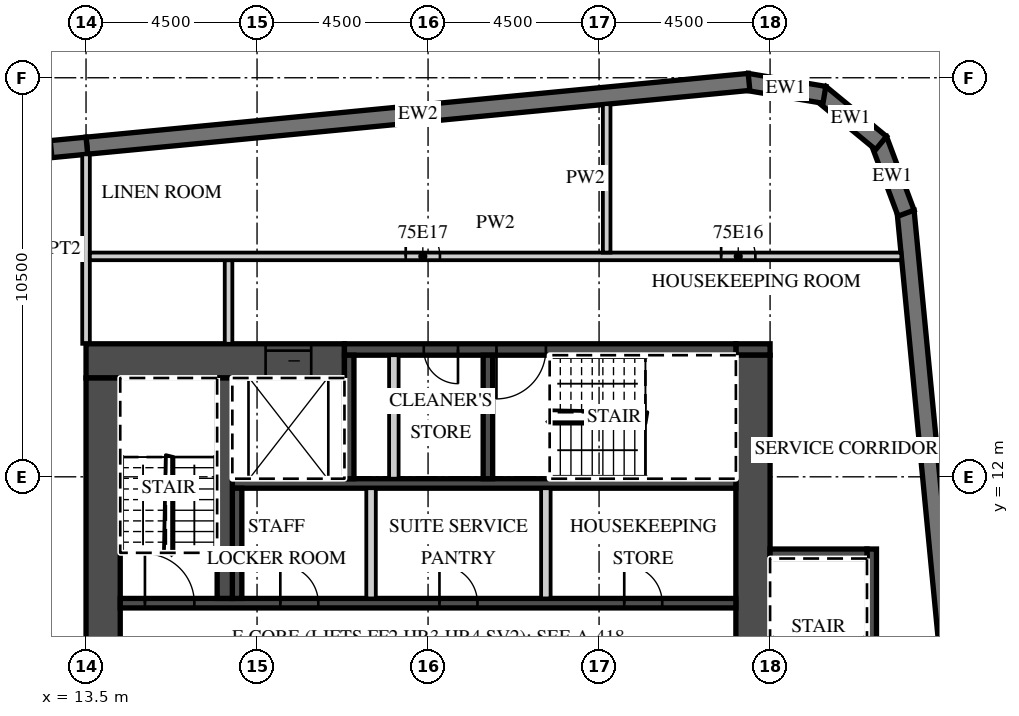
"""IFC4 building model, lengths in metres.
Left out: names, types, materials, properties, quantities, classifications, styles, units other than length and angle.
Written with IfcOpenShell. Run it as: python <this file> out.ifc"""

import sys

from ifc_helpers import new_model, si_unit, direction, frame, frame_2d, origin, place, context, subcontext, project, spatial, polyline, rectangle, outline, extrude, element, fill, save


model = new_model("IFC4")
c1 = context("Model", 3, precision=1e-05, world=origin(), true_north=direction((0.0, 1.0)))
c2 = subcontext(c1, "Body", "Model", "MODEL_VIEW")
j1 = project(units=[si_unit("LENGTHUNIT", "METRE"), si_unit("PLANEANGLEUNIT", "RADIAN")], contexts=[c1])
p1 = place(None, origin())
s1 = spatial("IfcSite", under=j1, at=p1, CompositionType="ELEMENT")
p2 = place(p1, origin())
s2 = spatial("IfcBuilding", under=s1, at=p2, CompositionType="ELEMENT")
p3 = place(p2, frame((0.0, 0.0, 298.2)))
s3 = spatial("IfcBuildingStorey", under=s2, at=p3, CompositionType="ELEMENT", Elevation=298.2)
p4 = place(p3, frame((38.132, -12.858, 0.0), z_axis=(0.0, 0.0, 1.0), x_axis=(-0.095847749461, 0.995396006082, 0.0)))
e1 = element("IfcWall", 1, at=p4, inside=s3, PredefinedType="SOLIDWALL", context=c2, shape_type="SweptSolid", body=[
    extrude(rectangle(XDim=32.0, YDim=0.45, at=frame_2d((16.0, 0.0))), origin(), (0.0, 0.0, 1.0), 3.02),
])
p5 = place(p3, frame((35.078, 18.938, 0.0), z_axis=(0.0, 0.0, 1.0), x_axis=(-0.350192909346, 0.936677599948, 0.0)))
e2 = element("IfcWall", 2, at=p5, inside=s3, PredefinedType="SOLIDWALL", context=c2, shape_type="SweptSolid", body=[
    extrude(outline(polyline([(0.0, -0.225), (2.071, -0.225), (1.95, 0.225), (0.121, 0.225), (0.0, -0.225)])), origin(), (0.0, 0.0, 1.0), 3.02),
])
p6 = place(p3, frame((34.421, 20.782, 0.0), z_axis=(0.0, 0.0, 1.0), x_axis=(-0.771593176315, 0.636116318187, 0.0)))
e3 = element("IfcWall", 3, at=p6, inside=s3, PredefinedType="SOLIDWALL", context=c2, shape_type="SweptSolid", body=[
    extrude(outline(polyline([(0.0, -0.225), (2.071, -0.225), (1.95, 0.225), (0.12, 0.225), (0.0, -0.225)])), origin(), (0.0, 0.0, 1.0), 3.02),
])
p7 = place(p3, frame((32.929, 22.051, 0.0), z_axis=(0.0, 0.0, 1.0), x_axis=(-0.986298144721, 0.164972633245, 0.0)))
e4 = element("IfcWall", 4, at=p7, inside=s3, PredefinedType="SOLIDWALL", context=c2, shape_type="SweptSolid", body=[
    extrude(outline(polyline([(0.0, -0.225), (2.07, -0.225), (1.95, 0.225), (0.121, 0.225), (0.0, -0.225)])), origin(), (0.0, 0.0, 1.0), 3.02),
])
p8 = place(p3, frame((30.946, 22.391, 0.0), z_axis=(0.0, 0.0, 1.0), x_axis=(-0.995396397117, -0.095843688398, 0.0)))
e5 = element("IfcWall", 5, at=p8, inside=s3, PredefinedType="SOLIDWALL", context=c2, shape_type="SweptSolid", body=[
    extrude(rectangle(XDim=17.505, YDim=0.45, at=frame_2d((8.752, 0.0))), origin(), (0.0, 0.0, 1.0), 3.02),
])
p9 = place(p3, frame((13.521, 20.713, 0.0), z_axis=(0.0, 0.0, 1.0), x_axis=(-0.995396277313, -0.095844932638, 0.0)))
e6 = element("IfcWall", 6, at=p9, inside=s3, PredefinedType="SOLIDWALL", context=c2, shape_type="SweptSolid", body=[
    extrude(rectangle(XDim=51.495, YDim=0.45, at=frame_2d((25.748, 0.0))), origin(), (0.0, 0.0, 1.0), 3.02),
])
p10 = place(p9, frame((0.91, 0.0, 0.45)))
e7 = element("IfcOpeningElement", 7, at=p10, cuts=e6, PredefinedType="OPENING", context=c2, shape_type="SweptSolid", body=[
    extrude(rectangle(XDim=2.7, YDim=2.25, at=frame_2d((1.35, 1.125))), frame((0.0, 0.235, 0.0), z_axis=(0.0, -1.0, 0.0), x_axis=(1.0, 0.0, 0.0)), (0.0, 0.0, 1.0), 0.47),
])
p11 = place(p9, frame((5.431, 0.0, 0.45)))
e8 = element("IfcOpeningElement", 8, at=p11, cuts=e6, PredefinedType="OPENING", context=c2, shape_type="SweptSolid", body=[
    extrude(rectangle(XDim=2.7, YDim=2.25, at=frame_2d((1.35, 1.125))), frame((0.0, 0.235, 0.0), z_axis=(0.0, -1.0, 0.0), x_axis=(1.0, 0.0, 0.0)), (0.0, 0.0, 1.0), 0.47),
])
p12 = place(p9, frame((9.952, 0.0, 0.45)))
e9 = element("IfcOpeningElement", 9, at=p12, cuts=e6, PredefinedType="OPENING", context=c2, shape_type="SweptSolid", body=[
    extrude(rectangle(XDim=2.7, YDim=2.25, at=frame_2d((1.35, 1.125))), frame((0.0, 0.235, 0.0), z_axis=(0.0, -1.0, 0.0), x_axis=(1.0, 0.0, 0.0)), (0.0, 0.0, 1.0), 0.47),
])
p13 = place(p9, frame((14.473, 0.0, 0.45)))
e10 = element("IfcOpeningElement", 10, at=p13, cuts=e6, PredefinedType="OPENING", context=c2, shape_type="SweptSolid", body=[
    extrude(rectangle(XDim=2.7, YDim=2.25, at=frame_2d((1.35, 1.125))), frame((0.0, 0.235, 0.0), z_axis=(0.0, -1.0, 0.0), x_axis=(1.0, 0.0, 0.0)), (0.0, 0.0, 1.0), 0.47),
])
p14 = place(p9, frame((18.994, 0.0, 0.45)))
e11 = element("IfcOpeningElement", 11, at=p14, cuts=e6, PredefinedType="OPENING", context=c2, shape_type="SweptSolid", body=[
    extrude(rectangle(XDim=2.7, YDim=2.25, at=frame_2d((1.35, 1.125))), frame((0.0, 0.235, 0.0), z_axis=(0.0, -1.0, 0.0), x_axis=(1.0, 0.0, 0.0)), (0.0, 0.0, 1.0), 0.47),
])
p15 = place(p9, frame((23.514, 0.0, 0.45)))
e12 = element("IfcOpeningElement", 12, at=p15, cuts=e6, PredefinedType="OPENING", context=c2, shape_type="SweptSolid", body=[
    extrude(rectangle(XDim=2.7, YDim=2.25, at=frame_2d((1.35, 1.125))), frame((0.0, 0.235, 0.0), z_axis=(0.0, -1.0, 0.0), x_axis=(1.0, 0.0, 0.0)), (0.0, 0.0, 1.0), 0.47),
])
p16 = place(p9, frame((28.035, 0.0, 0.45)))
e13 = element("IfcOpeningElement", 13, at=p16, cuts=e6, PredefinedType="OPENING", context=c2, shape_type="SweptSolid", body=[
    extrude(rectangle(XDim=2.7, YDim=2.25, at=frame_2d((1.35, 1.125))), frame((0.0, 0.235, 0.0), z_axis=(0.0, -1.0, 0.0), x_axis=(1.0, 0.0, 0.0)), (0.0, 0.0, 1.0), 0.47),
])
p17 = place(p9, frame((32.556, 0.0, 0.45)))
e14 = element("IfcOpeningElement", 14, at=p17, cuts=e6, PredefinedType="OPENING", context=c2, shape_type="SweptSolid", body=[
    extrude(rectangle(XDim=2.7, YDim=2.25, at=frame_2d((1.35, 1.125))), frame((0.0, 0.235, 0.0), z_axis=(0.0, -1.0, 0.0), x_axis=(1.0, 0.0, 0.0)), (0.0, 0.0, 1.0), 0.47),
])
p18 = place(p9, frame((37.077, 0.0, 0.45)))
e15 = element("IfcOpeningElement", 15, at=p18, cuts=e6, PredefinedType="OPENING", context=c2, shape_type="SweptSolid", body=[
    extrude(rectangle(XDim=2.7, YDim=2.25, at=frame_2d((1.35, 1.125))), frame((0.0, 0.235, 0.0), z_axis=(0.0, -1.0, 0.0), x_axis=(1.0, 0.0, 0.0)), (0.0, 0.0, 1.0), 0.47),
])
p19 = place(p9, frame((41.598, 0.0, 0.45)))
e16 = element("IfcOpeningElement", 16, at=p19, cuts=e6, PredefinedType="OPENING", context=c2, shape_type="SweptSolid", body=[
    extrude(rectangle(XDim=2.7, YDim=2.25, at=frame_2d((1.35, 1.125))), frame((0.0, 0.235, 0.0), z_axis=(0.0, -1.0, 0.0), x_axis=(1.0, 0.0, 0.0)), (0.0, 0.0, 1.0), 0.47),
])
p20 = place(p9, frame((46.118, 0.0, 0.45)))
e17 = element("IfcOpeningElement", 17, at=p20, cuts=e6, PredefinedType="OPENING", context=c2, shape_type="SweptSolid", body=[
    extrude(rectangle(XDim=2.7, YDim=2.25, at=frame_2d((1.35, 1.125))), frame((0.0, 0.235, 0.0), z_axis=(0.0, -1.0, 0.0), x_axis=(1.0, 0.0, 0.0)), (0.0, 0.0, 1.0), 0.47),
])
p21 = place(p3, frame((13.5, 15.5, 0.0), z_axis=(0.0, 0.0, 1.0), x_axis=(0.0, 1.0, 0.0)))
e18 = element("IfcWall", 18, at=p21, inside=s3, PredefinedType="PARTITIONING", context=c2, shape_type="SweptSolid", body=[
    extrude(rectangle(XDim=4.985, YDim=0.2, at=frame_2d((2.493, 0.0))), origin(), (0.0, 0.0, 1.0), 3.02),
])
p22 = place(p3, frame((13.5, 15.05, 0.0), z_axis=(0.0, 0.0, 1.0), x_axis=(1.0, 0.0, 0.0)))
e19 = element("IfcWall", 19, at=p22, inside=s3, PredefinedType="SHEAR", context=c2, shape_type="SweptSolid", body=[
    extrude(rectangle(XDim=6.8, YDim=0.9, at=frame_2d((3.4, 0.0))), origin(), (0.0, 0.0, 1.0), 3.02),
])
p23 = place(p22, frame((4.725, 0.0, 0.0)))
e20 = element("IfcOpeningElement", 20, at=p23, cuts=e19, PredefinedType="OPENING", context=c2, shape_type="SweptSolid", body=[
    extrude(rectangle(XDim=1.2, YDim=2.1, at=frame_2d((0.6, 1.05))), frame((0.0, 0.46, 0.0), z_axis=(0.0, -1.0, 0.0), x_axis=(1.0, 0.0, 0.0)), (0.0, 0.0, 1.0), 0.92),
])
p24 = place(p3, frame((30.6, 15.35, 0.0), z_axis=(0.0, 0.0, 1.0), x_axis=(1.0, 0.0, 0.0)))
e21 = element("IfcWall", 21, at=p24, inside=s3, PredefinedType="SHEAR", context=c2, shape_type="SweptSolid", body=[
    extrude(rectangle(XDim=0.9, YDim=0.3, at=frame_2d((0.45, 0.0))), origin(), (0.0, 0.0, 1.0), 3.02),
])
p25 = place(p3, frame((20.3, 15.35, 0.0), z_axis=(0.0, 0.0, 1.0), x_axis=(1.0, 0.0, 0.0)))
e22 = element("IfcWall", 22, at=p25, inside=s3, PredefinedType="SHEAR", context=c2, shape_type="SweptSolid", body=[
    extrude(rectangle(XDim=10.3, YDim=0.3, at=frame_2d((5.15, 0.0))), origin(), (0.0, 0.0, 1.0), 3.02),
])
p26 = place(p25, frame((4.0, 0.0, 0.0)))
e23 = element("IfcOpeningElement", 23, at=p26, cuts=e22, PredefinedType="OPENING", context=c2, shape_type="SweptSolid", body=[
    extrude(rectangle(XDim=1.3, YDim=2.1, at=frame_2d((0.65, 1.05))), frame((0.0, 0.16, 0.0), z_axis=(0.0, -1.0, 0.0), x_axis=(1.0, 0.0, 0.0)), (0.0, 0.0, 1.0), 0.32),
])
p27 = place(p25, frame((2.087, 0.0, 0.0)))
e24 = element("IfcOpeningElement", 24, at=p27, cuts=e22, PredefinedType="OPENING", context=c2, shape_type="SweptSolid", body=[
    extrude(rectangle(XDim=0.9, YDim=2.1, at=frame_2d((0.45, 1.05))), frame((0.0, 0.16, 0.0), z_axis=(0.0, -1.0, 0.0), x_axis=(1.0, 0.0, 0.0)), (0.0, 0.0, 1.0), 0.32),
])
p28 = place(p3, frame((31.05, 2.4, 0.0), z_axis=(0.0, 0.0, 1.0), x_axis=(0.0, 1.0, 0.0)))
e25 = element("IfcWall", 25, at=p28, inside=s3, PredefinedType="SHEAR", context=c2, shape_type="SweptSolid", body=[
    extrude(rectangle(XDim=12.8, YDim=0.9, at=frame_2d((6.4, 0.0))), origin(), (0.0, 0.0, 1.0), 3.02),
])
p29 = place(p28, frame((0.2, 0.0, 0.0)))
e26 = element("IfcOpeningElement", 26, at=p29, cuts=e25, PredefinedType="OPENING", context=c2, shape_type="SweptSolid", body=[
    extrude(rectangle(XDim=1.1, YDim=2.1, at=frame_2d((0.55, 1.05))), frame((0.0, 0.46, 0.0), z_axis=(0.0, -1.0, 0.0), x_axis=(1.0, 0.0, 0.0)), (0.0, 0.0, 1.0), 0.92),
])
p30 = place(p3, frame((13.95, 2.4, 0.0), z_axis=(0.0, 0.0, 1.0), x_axis=(0.0, 1.0, 0.0)))
e27 = element("IfcWall", 27, at=p30, inside=s3, PredefinedType="SHEAR", context=c2, shape_type="SweptSolid", body=[
    extrude(rectangle(XDim=12.2, YDim=0.9, at=frame_2d((6.1, 0.0))), origin(), (0.0, 0.0, 1.0), 3.02),
])
p31 = place(p3, frame((14.4, 8.675, 0.0), z_axis=(0.0, 0.0, 1.0), x_axis=(1.0, 0.0, 0.0)))
e28 = element("IfcWall", 28, at=p31, inside=s3, PredefinedType="SHEAR", context=c2, shape_type="SweptSolid", body=[
    extrude(rectangle(XDim=16.2, YDim=0.25, at=frame_2d((8.1, 0.0))), origin(), (0.0, 0.0, 1.0), 3.02),
])
p32 = place(p31, frame((0.65, 0.0, 0.0)))
e29 = element("IfcOpeningElement", 29, at=p32, cuts=e28, PredefinedType="OPENING", context=c2, shape_type="SweptSolid", body=[
    extrude(rectangle(XDim=1.3, YDim=2.1, at=frame_2d((0.65, 1.05))), frame((0.0, 0.135, 0.0), z_axis=(0.0, -1.0, 0.0), x_axis=(1.0, 0.0, 0.0)), (0.0, 0.0, 1.0), 0.27),
])
p33 = place(p31, frame((13.262, 0.0, 0.0)))
e30 = element("IfcOpeningElement", 30, at=p33, cuts=e28, PredefinedType="OPENING", context=c2, shape_type="SweptSolid", body=[
    extrude(rectangle(XDim=1.0, YDim=2.1, at=frame_2d((0.5, 1.05))), frame((0.0, 0.135, 0.0), z_axis=(0.0, -1.0, 0.0), x_axis=(1.0, 0.0, 0.0)), (0.0, 0.0, 1.0), 0.27),
])
p34 = place(p31, frame((8.4, 0.0, 0.0)))
e31 = element("IfcOpeningElement", 31, at=p34, cuts=e28, PredefinedType="OPENING", context=c2, shape_type="SweptSolid", body=[
    extrude(rectangle(XDim=1.0, YDim=2.1, at=frame_2d((0.5, 1.05))), frame((0.0, 0.135, 0.0), z_axis=(0.0, -1.0, 0.0), x_axis=(1.0, 0.0, 0.0)), (0.0, 0.0, 1.0), 0.27),
])
p35 = place(p31, frame((4.212, 0.0, 0.0)))
e32 = element("IfcOpeningElement", 32, at=p35, cuts=e28, PredefinedType="OPENING", context=c2, shape_type="SweptSolid", body=[
    extrude(rectangle(XDim=1.0, YDim=2.1, at=frame_2d((0.5, 1.05))), frame((0.0, 0.135, 0.0), z_axis=(0.0, -1.0, 0.0), x_axis=(1.0, 0.0, 0.0)), (0.0, 0.0, 1.0), 0.27),
])
p36 = place(p3, frame((17.35, 11.825, 0.0), z_axis=(0.0, 0.0, 1.0), x_axis=(1.0, 0.0, 0.0)))
e33 = element("IfcWall", 33, at=p36, inside=s3, PredefinedType="SHEAR", context=c2, shape_type="SweptSolid", body=[
    extrude(rectangle(XDim=13.25, YDim=0.25, at=frame_2d((6.625, 0.0))), origin(), (0.0, 0.0, 1.0), 3.02),
])
p37 = place(p3, frame((17.475, 8.8, 0.0), z_axis=(0.0, 0.0, 1.0), x_axis=(0.0, 1.0, 0.0)))
e34 = element("IfcWall", 34, at=p37, inside=s3, PredefinedType="SHEAR", context=c2, shape_type="SweptSolid", body=[
    extrude(rectangle(XDim=2.9, YDim=0.25, at=frame_2d((1.45, 0.0))), origin(), (0.0, 0.0, 1.0), 3.02),
])
for number, where, z_axis, x_axis in (
    (35, (25.6, 8.8, 0.0), (0.0, 0.0, 1.0), (0.0, 1.0, 0.0)),
    (36, (21.0, 8.8, 0.0), (0.0, 0.0, 1.0), (0.0, 1.0, 0.0)),
):
    element("IfcWall", number, at=place(p3, frame(where, z_axis=z_axis, x_axis=x_axis)), inside=s3, PredefinedType="PARTITIONING", context=c2, shape_type="SweptSolid", body=[
        extrude(rectangle(XDim=2.9, YDim=0.25, at=frame_2d((1.45, 0.0))), origin(), (0.0, 0.0, 1.0), 3.02),
    ])
p38 = place(p3, frame((17.15, 8.8, 0.0), z_axis=(0.0, 0.0, 1.0), x_axis=(0.0, 1.0, 0.0)))
e37 = element("IfcWall", 37, at=p38, inside=s3, PredefinedType="SHEAR", context=c2, shape_type="SweptSolid", body=[
    extrude(rectangle(XDim=5.8, YDim=0.4, at=frame_2d((2.9, 0.0))), origin(), (0.0, 0.0, 1.0), 3.02),
])
for number, where, z_axis, x_axis in (
    (38, (20.425, 11.95, 0.0), (0.0, 0.0, 1.0), (0.0, 1.0, 0.0)),
    (39, (24.075, 11.95, 0.0), (0.0, 0.0, 1.0), (0.0, 1.0, 0.0)),
):
    element("IfcWall", number, at=place(p3, frame(where, z_axis=z_axis, x_axis=x_axis)), inside=s3, PredefinedType="SHEAR", context=c2, shape_type="SweptSolid", body=[
        extrude(rectangle(XDim=3.25, YDim=0.25, at=frame_2d((1.625, 0.0))), origin(), (0.0, 0.0, 1.0), 3.02),
    ])
p39 = place(p3, frame((21.6, 11.95, 0.0), z_axis=(0.0, 0.0, 1.0), x_axis=(0.0, 1.0, 0.0)))
e40 = element("IfcWall", 40, at=p39, inside=s3, PredefinedType="PARTITIONING", context=c2, shape_type="SweptSolid", body=[
    extrude(rectangle(XDim=3.25, YDim=0.25, at=frame_2d((1.625, 0.0))), origin(), (0.0, 0.0, 1.0), 3.02),
])
p40 = place(p3, frame((34.175, 1.75, 0.0), z_axis=(0.0, 0.0, 1.0), x_axis=(0.0, 1.0, 0.0)))
e41 = element("IfcWall", 41, at=p40, inside=s3, PredefinedType="SHEAR", context=c2, shape_type="SweptSolid", body=[
    extrude(rectangle(XDim=8.35, YDim=0.25, at=frame_2d((4.175, 0.0))), origin(), (0.0, 0.0, 1.0), 3.02),
])
p41 = place(p3, frame((31.5, 9.975, 0.0), z_axis=(0.0, 0.0, 1.0), x_axis=(1.0, 0.0, 0.0)))
e42 = element("IfcWall", 42, at=p41, inside=s3, PredefinedType="SHEAR", context=c2, shape_type="SweptSolid", body=[
    extrude(rectangle(XDim=2.55, YDim=0.25, at=frame_2d((1.275, 0.0))), origin(), (0.0, 0.0, 1.0), 3.02),
])
p42 = place(p3, frame((17.25, 15.5, 0.0), z_axis=(0.0, 0.0, 1.0), x_axis=(0.0, 1.0, 0.0)))
e43 = element("IfcWall", 43, at=p42, inside=s3, PredefinedType="PARTITIONING", context=c2, shape_type="SweptSolid", body=[
    extrude(rectangle(XDim=2.2, YDim=0.2, at=frame_2d((1.1, 0.0))), origin(), (0.0, 0.0, 1.0), 3.02),
])
p43 = place(p3, frame((13.6, 17.8, 0.0), z_axis=(0.0, 0.0, 1.0), x_axis=(1.0, 0.0, 0.0)))
e44 = element("IfcWall", 44, at=p43, inside=s3, PredefinedType="PARTITIONING", context=c2, shape_type="SweptSolid", body=[
    extrude(rectangle(XDim=21.354, YDim=0.2, at=frame_2d((10.677, 0.0))), origin(), (0.0, 0.0, 1.0), 3.02),
])
p44 = place(p43, frame((16.613, 0.0, 0.0)))
e45 = element("IfcOpeningElement", 45, at=p44, cuts=e44, PredefinedType="OPENING", context=c2, shape_type="SweptSolid", body=[
    extrude(rectangle(XDim=0.9, YDim=2.1, at=frame_2d((0.45, 1.05))), frame((0.0, 0.11, 0.0), z_axis=(0.0, -1.0, 0.0), x_axis=(1.0, 0.0, 0.0)), (0.0, 0.0, 1.0), 0.22),
])
p45 = place(p43, frame((8.312, 0.0, 0.0)))
e46 = element("IfcOpeningElement", 46, at=p45, cuts=e44, PredefinedType="OPENING", context=c2, shape_type="SweptSolid", body=[
    extrude(rectangle(XDim=0.9, YDim=2.1, at=frame_2d((0.45, 1.05))), frame((0.0, 0.11, 0.0), z_axis=(0.0, -1.0, 0.0), x_axis=(1.0, 0.0, 0.0)), (0.0, 0.0, 1.0), 0.22),
])
p46 = place(p3, frame((27.2, 17.9, 0.0), z_axis=(0.0, 0.0, 1.0), x_axis=(0.0, 1.0, 0.0)))
e47 = element("IfcWall", 47, at=p46, inside=s3, PredefinedType="PARTITIONING", context=c2, shape_type="SweptSolid", body=[
    extrude(rectangle(XDim=3.905, YDim=0.2, at=frame_2d((1.953, 0.0))), origin(), (0.0, 0.0, 1.0), 3.02),
])
p47 = place(p10, origin())
e48 = element("IfcWindow", 48, at=p47, inside=s3, PartitioningType="SINGLE_PANEL", PredefinedType="WINDOW", context=c2, shape_type="SweptSolid", body=[
    extrude(rectangle(XDim=2.7, YDim=2.25, at=frame_2d((1.35, 1.125))), frame((0.0, 0.09, 0.0), z_axis=(0.0, -1.0, 0.0), x_axis=(1.0, 0.0, 0.0)), (0.0, 0.0, 1.0), 0.06),
])
fill(e7, e48)
p48 = place(p23, origin())
e49 = element("IfcDoor", 49, at=p48, inside=s3, OperationType="SLIDING_TO_LEFT", PredefinedType="DOOR", context=c2, shape_type="SweptSolid", body=[
    extrude(rectangle(XDim=1.2, YDim=2.1, at=frame_2d((0.6, 1.05))), frame((0.0, 0.025, 0.0), z_axis=(0.0, -1.0, 0.0), x_axis=(1.0, 0.0, 0.0)), (0.0, 0.0, 1.0), 0.05),
])
fill(e20, e49)
p49 = place(p32, origin())
e50 = element("IfcDoor", 50, at=p49, inside=s3, OperationType="SINGLE_SWING_LEFT", PredefinedType="DOOR", context=c2, shape_type="SweptSolid", body=[
    extrude(rectangle(XDim=1.3, YDim=2.1, at=frame_2d((0.65, 1.05))), frame((0.0, 0.025, 0.0), z_axis=(0.0, -1.0, 0.0), x_axis=(1.0, 0.0, 0.0)), (0.0, 0.0, 1.0), 0.05),
])
fill(e29, e50)
p50 = place(p26, origin())
e51 = element("IfcDoor", 51, at=p50, inside=s3, OperationType="SINGLE_SWING_LEFT", PredefinedType="DOOR", context=c2, shape_type="SweptSolid", body=[
    extrude(rectangle(XDim=1.3, YDim=2.1, at=frame_2d((0.65, 1.05))), frame((0.0, 0.025, 0.0), z_axis=(0.0, -1.0, 0.0), x_axis=(1.0, 0.0, 0.0)), (0.0, 0.0, 1.0), 0.05),
])
fill(e23, e51)
p51 = place(p27, origin())
e52 = element("IfcDoor", 52, at=p51, inside=s3, OperationType="SINGLE_SWING_RIGHT", PredefinedType="DOOR", context=c2, shape_type="SweptSolid", body=[
    extrude(rectangle(XDim=0.9, YDim=2.1, at=frame_2d((0.45, 1.05))), frame((0.0, 0.025, 0.0), z_axis=(0.0, -1.0, 0.0), x_axis=(1.0, 0.0, 0.0)), (0.0, 0.0, 1.0), 0.05),
])
fill(e24, e52)
p52 = place(p33, origin())
e53 = element("IfcDoor", 53, at=p52, inside=s3, OperationType="SINGLE_SWING_LEFT", PredefinedType="DOOR", context=c2, shape_type="SweptSolid", body=[
    extrude(rectangle(XDim=1.0, YDim=2.1, at=frame_2d((0.5, 1.05))), frame((0.0, 0.025, 0.0), z_axis=(0.0, -1.0, 0.0), x_axis=(1.0, 0.0, 0.0)), (0.0, 0.0, 1.0), 0.05),
])
fill(e30, e53)
p53 = place(p34, origin())
e54 = element("IfcDoor", 54, at=p53, inside=s3, OperationType="SINGLE_SWING_LEFT", PredefinedType="DOOR", context=c2, shape_type="SweptSolid", body=[
    extrude(rectangle(XDim=1.0, YDim=2.1, at=frame_2d((0.5, 1.05))), frame((0.0, 0.025, 0.0), z_axis=(0.0, -1.0, 0.0), x_axis=(1.0, 0.0, 0.0)), (0.0, 0.0, 1.0), 0.05),
])
fill(e31, e54)
p54 = place(p35, origin())
e55 = element("IfcDoor", 55, at=p54, inside=s3, OperationType="SINGLE_SWING_LEFT", PredefinedType="DOOR", context=c2, shape_type="SweptSolid", body=[
    extrude(rectangle(XDim=1.0, YDim=2.1, at=frame_2d((0.5, 1.05))), frame((0.0, 0.025, 0.0), z_axis=(0.0, -1.0, 0.0), x_axis=(1.0, 0.0, 0.0)), (0.0, 0.0, 1.0), 0.05),
])
fill(e32, e55)
p55 = place(p44, origin())
e56 = element("IfcDoor", 56, at=p55, inside=s3, OperationType="SINGLE_SWING_LEFT", PredefinedType="DOOR", context=c2, shape_type="SweptSolid", body=[
    extrude(rectangle(XDim=0.9, YDim=2.1, at=frame_2d((0.45, 1.05))), frame((0.0, 0.025, 0.0), z_axis=(0.0, -1.0, 0.0), x_axis=(1.0, 0.0, 0.0)), (0.0, 0.0, 1.0), 0.05),
])
fill(e45, e56)
p56 = place(p45, origin())
e57 = element("IfcDoor", 57, at=p56, inside=s3, OperationType="SINGLE_SWING_LEFT", PredefinedType="DOOR", context=c2, shape_type="SweptSolid", body=[
    extrude(rectangle(XDim=0.9, YDim=2.1, at=frame_2d((0.45, 1.05))), frame((0.0, 0.025, 0.0), z_axis=(0.0, -1.0, 0.0), x_axis=(1.0, 0.0, 0.0)), (0.0, 0.0, 1.0), 0.05),
])
fill(e46, e57)
save(model, sys.argv[1])
